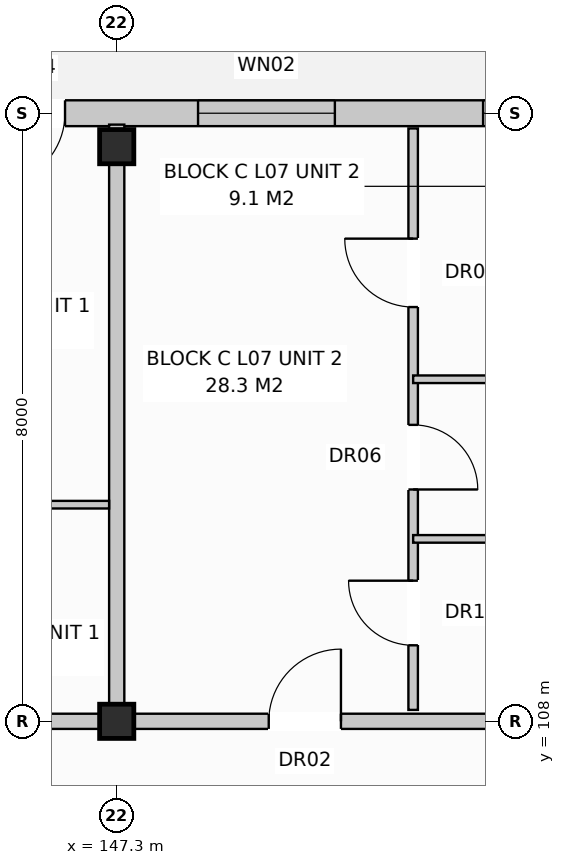
"""IFC4 building model, lengths in metres.
Left out: names, types, materials, properties, quantities, classifications, styles, units other than length and angle.
Written with IfcOpenShell. Run it as: python <this file> out.ifc"""

import sys

from ifc_helpers import new_model, si_unit, direction, frame, frame_2d, origin, origin_with_axes, origin_2d, place, context, subcontext, project, spatial, rectangle, extrude, element, fill, save


model = new_model("IFC4")
c1 = context("Model", 3, precision=1e-05, world=origin(), true_north=direction((0.0, 1.0)))
c2 = subcontext(c1, "Body", "Model", "MODEL_VIEW")
j1 = project(units=[si_unit("LENGTHUNIT", "METRE"), si_unit("PLANEANGLEUNIT", "RADIAN")], contexts=[c1])
p1 = place(None, origin())
s1 = spatial("IfcSite", under=j1, at=p1, CompositionType="ELEMENT")
p2 = place(p1, origin())
s2 = spatial("IfcBuilding", under=s1, at=p2, CompositionType="ELEMENT")
p3 = place(p2, frame((0.0, 0.0, 24.0)))
s3 = spatial("IfcBuildingStorey", under=s2, at=p3, CompositionType="ELEMENT", Elevation=24.0)
for number, where, z_axis, x_axis in (
    (1, (147.3, 108.0, 0.0), (0.0, 0.0, 1.0), (1.0, 0.0, 0.0)),
    (2, (147.3, 115.56, 0.0), (0.0, 0.0, 1.0), (1.0, 0.0, 0.0)),
):
    element("IfcColumn", number, at=place(p3, frame(where, z_axis=z_axis, x_axis=x_axis)), inside=s3, PredefinedType="COLUMN", context=c2, shape_type="SweptSolid", body=[
        extrude(rectangle(XDim=0.45, YDim=0.45, at=origin_2d()), origin(), (0.0, 0.0, 1.0), 3.2),
    ])
p4 = place(p3, frame((126.76, 116.0, 0.0), z_axis=(0.0, 0.0, 1.0), x_axis=(1.0, 0.0, 0.0)))
e3 = element("IfcWall", 3, at=p4, inside=s3, PredefinedType="STANDARD", context=c2, shape_type="SweptSolid", body=[
    extrude(rectangle(XDim=41.08, YDim=0.34, at=frame_2d((20.54, 0.0))), origin(), (0.0, 0.0, 1.0), 2.95),
])
p5 = place(p4, frame((4.911, 0.0, 0.0)))
e4 = element("IfcOpeningElement", 4, at=p5, cuts=e3, PredefinedType="OPENING", context=c2, shape_type="SweptSolid", body=[
    extrude(rectangle(XDim=0.95, YDim=2.1, at=frame_2d((0.475, 1.05))), frame((0.0, 0.182, 0.0), z_axis=(0.0, -1.0, 0.0), x_axis=(1.0, 0.0, 0.0)), (0.0, 0.0, 1.0), 0.364),
])
p6 = place(p4, frame((18.91, 0.0, 0.0)))
e5 = element("IfcOpeningElement", 5, at=p6, cuts=e3, PredefinedType="OPENING", context=c2, shape_type="SweptSolid", body=[
    extrude(rectangle(XDim=0.95, YDim=2.1, at=frame_2d((0.475, 1.05))), frame((0.0, 0.182, 0.0), z_axis=(0.0, -1.0, 0.0), x_axis=(1.0, 0.0, 0.0)), (0.0, 0.0, 1.0), 0.364),
])
p7 = place(p4, frame((30.411, 0.0, 0.0)))
e6 = element("IfcOpeningElement", 6, at=p7, cuts=e3, PredefinedType="OPENING", context=c2, shape_type="SweptSolid", body=[
    extrude(rectangle(XDim=0.95, YDim=2.1, at=frame_2d((0.475, 1.05))), frame((0.0, 0.182, 0.0), z_axis=(0.0, -1.0, 0.0), x_axis=(1.0, 0.0, 0.0)), (0.0, 0.0, 1.0), 0.364),
])
p8 = place(p4, frame((2.46, 0.0, 0.72)))
e7 = element("IfcOpeningElement", 7, at=p8, cuts=e3, PredefinedType="OPENING", context=c2, shape_type="SweptSolid", body=[
    extrude(rectangle(XDim=1.1, YDim=1.5, at=frame_2d((0.55, 0.75))), frame((0.0, 0.182, 0.0), z_axis=(0.0, -1.0, 0.0), x_axis=(1.0, 0.0, 0.0)), (0.0, 0.0, 1.0), 0.364),
])
p9 = place(p4, frame((7.81, 0.0, 0.8)))
e8 = element("IfcOpeningElement", 8, at=p9, cuts=e3, PredefinedType="OPENING", context=c2, shape_type="SweptSolid", body=[
    extrude(rectangle(XDim=1.8, YDim=1.7, at=frame_2d((0.9, 0.85))), frame((0.0, 0.182, 0.0), z_axis=(0.0, -1.0, 0.0), x_axis=(1.0, 0.0, 0.0)), (0.0, 0.0, 1.0), 0.364),
])
p10 = place(p4, frame((14.56, 0.0, 0.72)))
e9 = element("IfcOpeningElement", 9, at=p10, cuts=e3, PredefinedType="OPENING", context=c2, shape_type="SweptSolid", body=[
    extrude(rectangle(XDim=1.1, YDim=1.5, at=frame_2d((0.55, 0.75))), frame((0.0, 0.182, 0.0), z_axis=(0.0, -1.0, 0.0), x_axis=(1.0, 0.0, 0.0)), (0.0, 0.0, 1.0), 0.364),
])
p11 = place(p4, frame((16.76, 0.0, 0.8)))
e10 = element("IfcOpeningElement", 10, at=p11, cuts=e3, PredefinedType="OPENING", context=c2, shape_type="SweptSolid", body=[
    extrude(rectangle(XDim=1.9, YDim=1.85, at=frame_2d((0.95, 0.925))), frame((0.0, 0.182, 0.0), z_axis=(0.0, -1.0, 0.0), x_axis=(1.0, 0.0, 0.0)), (0.0, 0.0, 1.0), 0.364),
])
p12 = place(p4, frame((21.61, 0.0, 0.8)))
e11 = element("IfcOpeningElement", 11, at=p12, cuts=e3, PredefinedType="OPENING", context=c2, shape_type="SweptSolid", body=[
    extrude(rectangle(XDim=1.8, YDim=1.7, at=frame_2d((0.9, 0.85))), frame((0.0, 0.182, 0.0), z_axis=(0.0, -1.0, 0.0), x_axis=(1.0, 0.0, 0.0)), (0.0, 0.0, 1.0), 0.364),
])
p13 = place(p4, frame((25.36, 0.0, 0.72)))
e12 = element("IfcOpeningElement", 12, at=p13, cuts=e3, PredefinedType="OPENING", context=c2, shape_type="SweptSolid", body=[
    extrude(rectangle(XDim=1.1, YDim=1.5, at=frame_2d((0.55, 0.75))), frame((0.0, 0.182, 0.0), z_axis=(0.0, -1.0, 0.0), x_axis=(1.0, 0.0, 0.0)), (0.0, 0.0, 1.0), 0.364),
])
p14 = place(p4, frame((28.66, 0.0, 0.72)))
e13 = element("IfcOpeningElement", 13, at=p14, cuts=e3, PredefinedType="OPENING", context=c2, shape_type="SweptSolid", body=[
    extrude(rectangle(XDim=1.1, YDim=1.5, at=frame_2d((0.55, 0.75))), frame((0.0, 0.182, 0.0), z_axis=(0.0, -1.0, 0.0), x_axis=(1.0, 0.0, 0.0)), (0.0, 0.0, 1.0), 0.364),
])
p15 = place(p4, frame((32.01, 0.0, 0.8)))
e14 = element("IfcOpeningElement", 14, at=p15, cuts=e3, PredefinedType="OPENING", context=c2, shape_type="SweptSolid", body=[
    extrude(rectangle(XDim=1.8, YDim=1.7, at=frame_2d((0.9, 0.85))), frame((0.0, 0.182, 0.0), z_axis=(0.0, -1.0, 0.0), x_axis=(1.0, 0.0, 0.0)), (0.0, 0.0, 1.0), 0.364),
])
p16 = place(p4, frame((38.06, 0.0, 0.72)))
e15 = element("IfcOpeningElement", 15, at=p16, cuts=e3, PredefinedType="OPENING", context=c2, shape_type="SweptSolid", body=[
    extrude(rectangle(XDim=1.1, YDim=1.5, at=frame_2d((0.55, 0.75))), frame((0.0, 0.182, 0.0), z_axis=(0.0, -1.0, 0.0), x_axis=(1.0, 0.0, 0.0)), (0.0, 0.0, 1.0), 0.364),
])
p17 = place(p3, frame((147.3, 108.15, 0.0), z_axis=(0.0, 0.0, 1.0), x_axis=(0.0, 1.0, 0.0)))
e16 = element("IfcWall", 16, at=p17, inside=s3, PredefinedType="PARTITIONING", context=c2, shape_type="SweptSolid", body=[
    extrude(rectangle(XDim=7.7, YDim=0.2, at=frame_2d((3.85, 0.0))), origin(), (0.0, 0.0, 1.0), 2.95),
])
p18 = place(p3, frame((126.6, 108.0, 0.0), z_axis=(0.0, 0.0, 1.0), x_axis=(1.0, 0.0, 0.0)))
e17 = element("IfcWall", 17, at=p18, inside=s3, PredefinedType="PARTITIONING", context=c2, shape_type="SweptSolid", body=[
    extrude(rectangle(XDim=20.7, YDim=0.2, at=frame_2d((10.35, 0.0))), origin(), (0.0, 0.0, 1.0), 2.39),
])
p19 = place(p18, frame((2.4, 0.0, 0.0)))
e18 = element("IfcOpeningElement", 18, at=p19, cuts=e17, PredefinedType="OPENING", context=c2, shape_type="SweptSolid", body=[
    extrude(rectangle(XDim=0.95, YDim=2.15, at=frame_2d((0.475, 1.075))), frame((0.0, 0.112, 0.0), z_axis=(0.0, -1.0, 0.0), x_axis=(1.0, 0.0, 0.0)), (0.0, 0.0, 1.0), 0.224),
])
p20 = place(p3, frame((132.9, 110.85, 0.0), z_axis=(0.0, 0.0, 1.0), x_axis=(1.0, 0.0, 0.0)))
e19 = element("IfcWall", 19, at=p20, inside=s3, PredefinedType="PARTITIONING", context=c2, shape_type="SweptSolid", body=[
    extrude(rectangle(XDim=14.3, YDim=0.1, at=frame_2d((7.15, 0.0))), origin(), (0.0, 0.0, 1.0), 2.95),
])
p21 = place(p20, frame((1.6, 0.0, 0.0)))
e20 = element("IfcOpeningElement", 20, at=p21, cuts=e19, PredefinedType="OPENING", context=c2, shape_type="SweptSolid", body=[
    extrude(rectangle(XDim=0.9, YDim=2.1, at=frame_2d((0.45, 1.05))), frame((0.0, 0.062, 0.0), z_axis=(0.0, -1.0, 0.0), x_axis=(1.0, 0.0, 0.0)), (0.0, 0.0, 1.0), 0.124),
])
p22 = place(p20, frame((5.1, 0.0, 0.0)))
e21 = element("IfcOpeningElement", 21, at=p22, cuts=e19, PredefinedType="OPENING", context=c2, shape_type="SweptSolid", body=[
    extrude(rectangle(XDim=0.85, YDim=2.05, at=frame_2d((0.425, 1.025))), frame((0.0, 0.062, 0.0), z_axis=(0.0, -1.0, 0.0), x_axis=(1.0, 0.0, 0.0)), (0.0, 0.0, 1.0), 0.124),
])
p23 = place(p20, frame((8.2, 0.0, 0.0)))
e22 = element("IfcOpeningElement", 22, at=p23, cuts=e19, PredefinedType="OPENING", context=c2, shape_type="SweptSolid", body=[
    extrude(rectangle(XDim=0.85, YDim=2.05, at=frame_2d((0.425, 1.025))), frame((0.0, 0.062, 0.0), z_axis=(0.0, -1.0, 0.0), x_axis=(1.0, 0.0, 0.0)), (0.0, 0.0, 1.0), 0.124),
])
p24 = place(p20, frame((11.6, 0.0, 0.0)))
e23 = element("IfcOpeningElement", 23, at=p24, cuts=e19, PredefinedType="OPENING", context=c2, shape_type="SweptSolid", body=[
    extrude(rectangle(XDim=0.85, YDim=2.05, at=frame_2d((0.425, 1.025))), frame((0.0, 0.062, 0.0), z_axis=(0.0, -1.0, 0.0), x_axis=(1.0, 0.0, 0.0)), (0.0, 0.0, 1.0), 0.124),
])
p25 = place(p3, frame((147.3, 108.0, 0.0), z_axis=(0.0, 0.0, 1.0), x_axis=(1.0, 0.0, 0.0)))
e24 = element("IfcWall", 24, at=p25, inside=s3, PredefinedType="PARTITIONING", context=c2, shape_type="SweptSolid", body=[
    extrude(rectangle(XDim=6.9, YDim=0.2, at=frame_2d((3.45, 0.0))), origin(), (0.0, 0.0, 1.0), 2.39),
])
p26 = place(p25, frame((2.0, 0.0, 0.0)))
e25 = element("IfcOpeningElement", 25, at=p26, cuts=e24, PredefinedType="OPENING", context=c2, shape_type="SweptSolid", body=[
    extrude(rectangle(XDim=0.95, YDim=2.15, at=frame_2d((0.475, 1.075))), frame((0.0, 0.112, 0.0), z_axis=(0.0, -1.0, 0.0), x_axis=(1.0, 0.0, 0.0)), (0.0, 0.0, 1.0), 0.224),
])
p27 = place(p3, frame((151.2, 108.15, 0.0), z_axis=(0.0, 0.0, 1.0), x_axis=(0.0, 1.0, 0.0)))
e26 = element("IfcWall", 26, at=p27, inside=s3, PredefinedType="PARTITIONING", context=c2, shape_type="SweptSolid", body=[
    extrude(rectangle(XDim=7.65, YDim=0.125, at=frame_2d((3.825, 0.0))), origin(), (0.0, 0.0, 1.0), 2.95),
])
p28 = place(p27, frame((0.85, 0.0, 0.0)))
e27 = element("IfcOpeningElement", 27, at=p28, cuts=e26, PredefinedType="OPENING", context=c2, shape_type="SweptSolid", body=[
    extrude(rectangle(XDim=0.85, YDim=2.1, at=frame_2d((0.425, 1.05))), frame((0.0, 0.074, 0.0), z_axis=(0.0, -1.0, 0.0), x_axis=(1.0, 0.0, 0.0)), (0.0, 0.0, 1.0), 0.149),
])
p29 = place(p27, frame((2.9, 0.0, 0.0)))
e28 = element("IfcOpeningElement", 28, at=p29, cuts=e26, PredefinedType="OPENING", context=c2, shape_type="SweptSolid", body=[
    extrude(rectangle(XDim=0.85, YDim=2.05, at=frame_2d((0.425, 1.025))), frame((0.0, 0.074, 0.0), z_axis=(0.0, -1.0, 0.0), x_axis=(1.0, 0.0, 0.0)), (0.0, 0.0, 1.0), 0.149),
])
p30 = place(p27, frame((5.3, 0.0, 0.0)))
e29 = element("IfcOpeningElement", 29, at=p30, cuts=e26, PredefinedType="OPENING", context=c2, shape_type="SweptSolid", body=[
    extrude(rectangle(XDim=0.9, YDim=2.1, at=frame_2d((0.45, 1.05))), frame((0.0, 0.074, 0.0), z_axis=(0.0, -1.0, 0.0), x_axis=(1.0, 0.0, 0.0)), (0.0, 0.0, 1.0), 0.149),
])
for number, where, z_axis, x_axis in (
    (30, (151.2, 110.4, 0.0), (0.0, 0.0, 1.0), (1.0, 0.0, 0.0)),
    (31, (151.2, 112.5, 0.0), (0.0, 0.0, 1.0), (1.0, 0.0, 0.0)),
):
    element("IfcWall", number, at=place(p3, frame(where, z_axis=z_axis, x_axis=x_axis)), inside=s3, PredefinedType="PARTITIONING", context=c2, shape_type="SweptSolid", body=[
        extrude(rectangle(XDim=2.9, YDim=0.1, at=frame_2d((1.45, 0.0))), origin(), (0.0, 0.0, 1.0), 2.95),
    ])
p31 = place(p6, frame((0.95, 0.0, 0.0), z_axis=(0.0, 0.0, 1.0), x_axis=(-1.0, 0.0, 0.0)))
e32 = element("IfcDoor", 32, at=p31, inside=s3, OperationType="SINGLE_SWING_LEFT", PredefinedType="DOOR", context=c2, shape_type="SweptSolid", body=[
    extrude(rectangle(XDim=0.95, YDim=2.1, at=frame_2d((0.475, 1.05))), frame((0.0, 0.025, 0.0), z_axis=(0.0, -1.0, 0.0), x_axis=(1.0, 0.0, 0.0)), (0.0, 0.0, 1.0), 0.05),
])
fill(e5, e32)
p32 = place(p12, origin_with_axes())
e33 = element("IfcWindow", 33, at=p32, inside=s3, PartitioningType="SINGLE_PANEL", PredefinedType="WINDOW", context=c2, shape_type="SweptSolid", body=[
    extrude(rectangle(XDim=1.8, YDim=1.7, at=frame_2d((0.9, 0.85))), frame((0.0, 0.03, 0.0), z_axis=(0.0, -1.0, 0.0), x_axis=(1.0, 0.0, 0.0)), (0.0, 0.0, 1.0), 0.06),
])
fill(e11, e33)
p33 = place(p13, origin_with_axes())
e34 = element("IfcWindow", 34, at=p33, inside=s3, PartitioningType="SINGLE_PANEL", PredefinedType="WINDOW", context=c2, shape_type="SweptSolid", body=[
    extrude(rectangle(XDim=1.1, YDim=1.5, at=frame_2d((0.55, 0.75))), frame((0.0, 0.03, 0.0), z_axis=(0.0, -1.0, 0.0), x_axis=(1.0, 0.0, 0.0)), (0.0, 0.0, 1.0), 0.06),
])
fill(e12, e34)
p34 = place(p26, origin_with_axes())
e35 = element("IfcDoor", 35, at=p34, inside=s3, OperationType="SINGLE_SWING_RIGHT", PredefinedType="DOOR", context=c2, shape_type="SweptSolid", body=[
    extrude(rectangle(XDim=0.95, YDim=2.15, at=frame_2d((0.475, 1.075))), frame((0.0, 0.025, 0.0), z_axis=(0.0, -1.0, 0.0), x_axis=(1.0, 0.0, 0.0)), (0.0, 0.0, 1.0), 0.05),
])
fill(e25, e35)
p35 = place(p28, origin_with_axes())
e36 = element("IfcDoor", 36, at=p35, inside=s3, OperationType="SINGLE_SWING_RIGHT", PredefinedType="DOOR", context=c2, shape_type="SweptSolid", body=[
    extrude(rectangle(XDim=0.85, YDim=2.1, at=frame_2d((0.425, 1.05))), frame((0.0, 0.025, 0.0), z_axis=(0.0, -1.0, 0.0), x_axis=(1.0, 0.0, 0.0)), (0.0, 0.0, 1.0), 0.05),
])
fill(e27, e36)
p36 = place(p29, frame((0.85, 0.0, 0.0), z_axis=(0.0, 0.0, 1.0), x_axis=(-1.0, 0.0, 0.0)))
e37 = element("IfcDoor", 37, at=p36, inside=s3, OperationType="SINGLE_SWING_LEFT", PredefinedType="DOOR", context=c2, shape_type="SweptSolid", body=[
    extrude(rectangle(XDim=0.85, YDim=2.05, at=frame_2d((0.425, 1.025))), frame((0.0, 0.025, 0.0), z_axis=(0.0, -1.0, 0.0), x_axis=(1.0, 0.0, 0.0)), (0.0, 0.0, 1.0), 0.05),
])
fill(e28, e37)
p37 = place(p30, origin_with_axes())
e38 = element("IfcDoor", 38, at=p37, inside=s3, OperationType="SINGLE_SWING_RIGHT", PredefinedType="DOOR", context=c2, shape_type="SweptSolid", body=[
    extrude(rectangle(XDim=0.9, YDim=2.1, at=frame_2d((0.45, 1.05))), frame((0.0, 0.025, 0.0), z_axis=(0.0, -1.0, 0.0), x_axis=(1.0, 0.0, 0.0)), (0.0, 0.0, 1.0), 0.05),
])
fill(e29, e38)
save(model, sys.argv[1])
